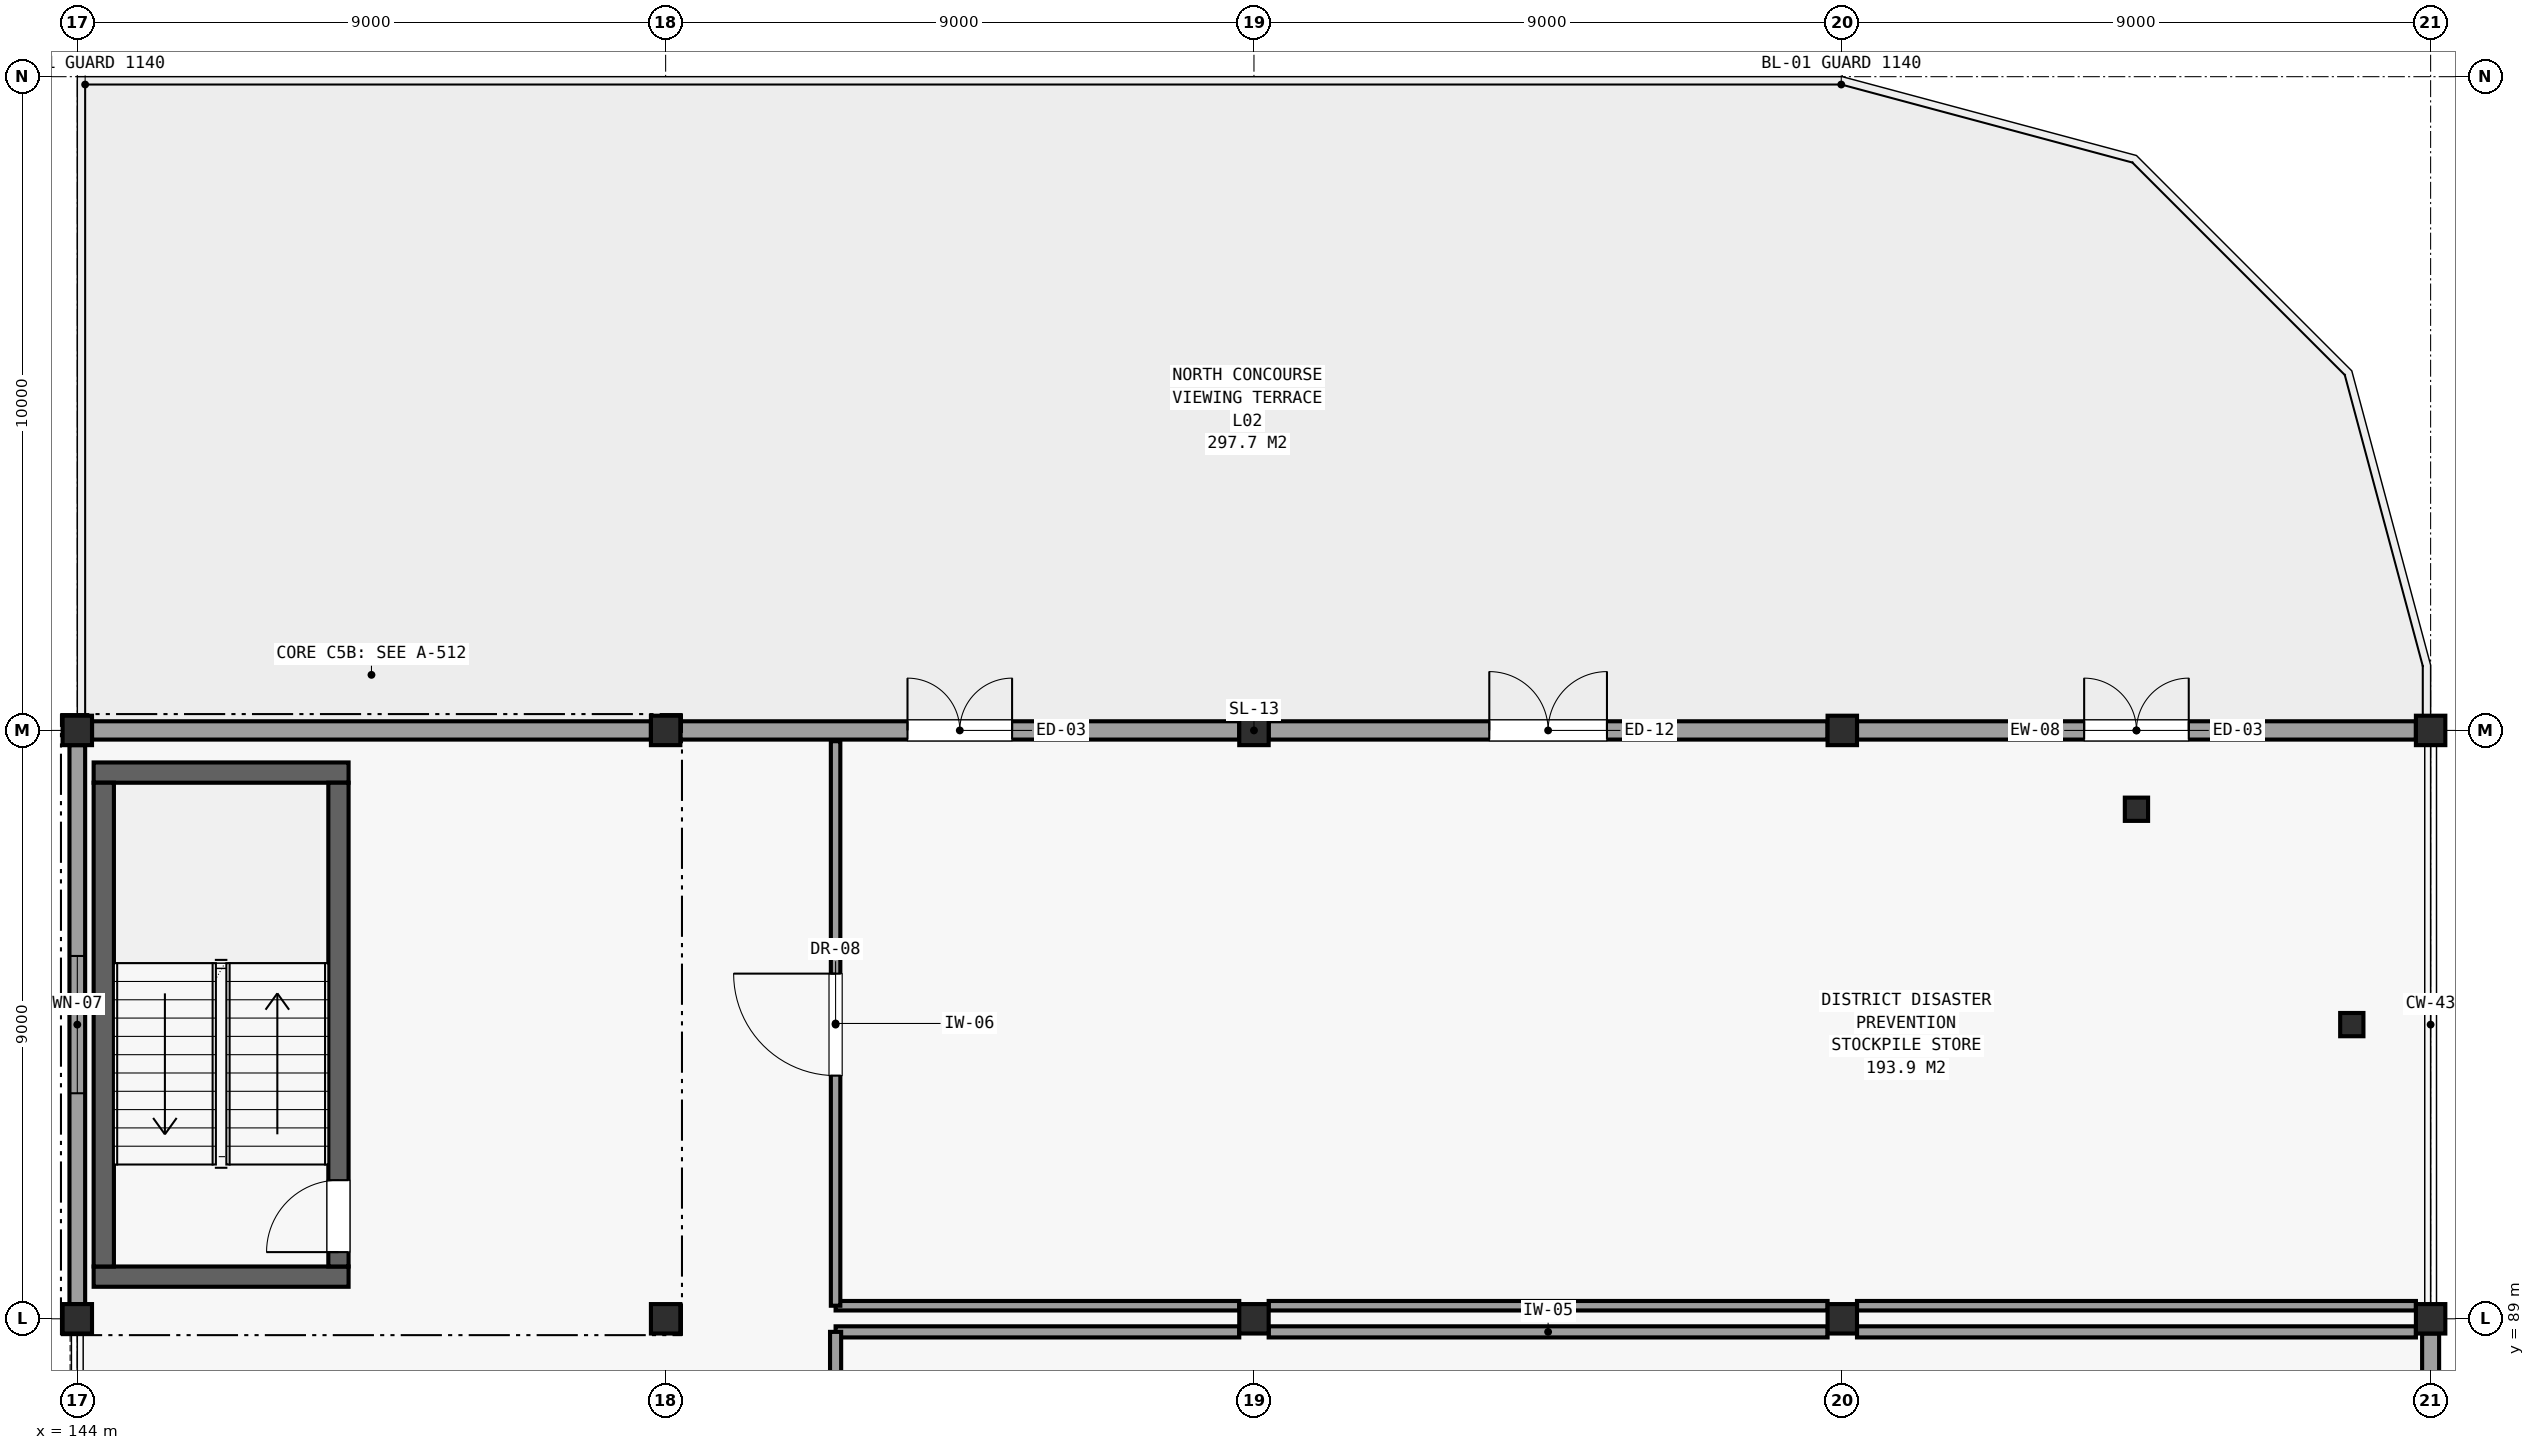
"""IFC4 building model, lengths in metres.
Left out: names, types, materials, properties, quantities, classifications, styles, units other than length and angle.
Written with IfcOpenShell. Run it as: python <this file> out.ifc"""

import sys

from ifc_helpers import new_model, si_unit, direction, frame, frame_2d, origin, origin_2d, place, context, subcontext, project, spatial, rectangle, hollow_rectangle, hollow_circle, extrude, element, fill, save


model = new_model("IFC4")
c1 = context("Model", 3, precision=1e-05, world=origin(), true_north=direction((0.0, 1.0)))
c2 = subcontext(c1, "Body", "Model", "MODEL_VIEW")
j1 = project(units=[si_unit("LENGTHUNIT", "METRE"), si_unit("PLANEANGLEUNIT", "RADIAN")], contexts=[c1])
p1 = place(None, origin())
s1 = spatial("IfcSite", under=j1, at=p1, CompositionType="ELEMENT")
p2 = place(p1, origin())
s2 = spatial("IfcBuilding", under=s1, at=p2, CompositionType="ELEMENT")
p3 = place(p2, frame((0.0, 0.0, 9.3)))
s3 = spatial("IfcBuildingStorey", under=s2, at=p3, CompositionType="ELEMENT", Elevation=9.3)
for number, where, z_axis, x_axis in (
    (1, (144.0, 89.0, 0.0), (0.0, 0.0, 1.0), (1.0, 0.0, 0.0)),
    (2, (144.0, 98.0, 0.0), (0.0, 0.0, 1.0), (1.0, 0.0, 0.0)),
    (3, (153.0, 89.0, 0.0), (0.0, 0.0, 1.0), (1.0, 0.0, 0.0)),
    (4, (153.0, 98.0, 0.0), (0.0, 0.0, 1.0), (1.0, 0.0, 0.0)),
    (5, (162.0, 89.0, 0.0), (0.0, 0.0, 1.0), (1.0, 0.0, 0.0)),
    (6, (162.0, 98.0, 0.0), (0.0, 0.0, 1.0), (1.0, 0.0, 0.0)),
    (7, (171.0, 89.0, 0.0), (0.0, 0.0, 1.0), (1.0, 0.0, 0.0)),
    (8, (171.0, 98.0, 0.0), (0.0, 0.0, 1.0), (1.0, 0.0, 0.0)),
):
    element("IfcColumn", number, at=place(p3, frame(where, z_axis=z_axis, x_axis=x_axis)), inside=s3, PredefinedType="COLUMN", context=c2, shape_type="SweptSolid", body=[
        extrude(hollow_rectangle(XDim=0.45, YDim=0.45, WallThickness=0.022, at=origin_2d()), origin(), (0.0, 0.0, 1.0), 4.2),
    ])
for number, where, z_axis, x_axis in (
    (9, (175.5, 96.794, 0.0), (0.0, 0.0, 1.0), (1.0, 0.0, 0.0)),
    (10, (178.794, 93.5, 0.0), (0.0, 0.0, 1.0), (1.0, 0.0, 0.0)),
):
    element("IfcColumn", number, at=place(p3, frame(where, z_axis=z_axis, x_axis=x_axis)), inside=s3, PredefinedType="COLUMN", context=c2, shape_type="SweptSolid", body=[
        extrude(hollow_circle(Radius=0.178, WallThickness=0.013, at=origin_2d()), origin(), (0.0, 0.0, 1.0), 4.2),
    ])
for number, where, z_axis, x_axis in (
    (11, (180.0, 89.0, 0.0), (0.0, 0.0, 1.0), (1.0, 0.0, 0.0)),
    (12, (180.0, 98.0, 0.0), (0.0, 0.0, 1.0), (1.0, 0.0, 0.0)),
):
    element("IfcColumn", number, at=place(p3, frame(where, z_axis=z_axis, x_axis=x_axis)), inside=s3, PredefinedType="COLUMN", context=c2, shape_type="SweptSolid", body=[
        extrude(hollow_rectangle(XDim=0.45, YDim=0.45, WallThickness=0.022, at=origin_2d()), origin(), (0.0, 0.0, 1.0), 4.2),
    ])
p4 = place(p3, frame((180.0, 80.225, 0.0), z_axis=(0.0, 0.0, 1.0), x_axis=(0.0, 1.0, 0.0)))
e13 = element("IfcWall", 13, at=p4, inside=s3, PredefinedType="SOLIDWALL", context=c2, shape_type="SweptSolid", body=[
    extrude(rectangle(XDim=8.55, YDim=0.26, at=frame_2d((4.275, 0.0))), origin(), (0.0, 0.0, 1.0), 3.3),
])
p5 = place(p4, frame((3.075, 0.0, 0.95)))
e14 = element("IfcOpeningElement", 14, at=p5, cuts=e13, PredefinedType="OPENING", context=c2, shape_type="SweptSolid", body=[
    extrude(rectangle(XDim=2.4, YDim=1.3, at=frame_2d((1.2, 0.65))), frame((0.0, 0.141, 0.0), z_axis=(0.0, -1.0, 0.0), x_axis=(1.0, 0.0, 0.0)), (0.0, 0.0, 1.0), 0.282),
])
p6 = place(p3, frame((179.775, 98.0, 0.0), z_axis=(0.0, 0.0, 1.0), x_axis=(-1.0, 0.0, 0.0)))
e15 = element("IfcWall", 15, at=p6, inside=s3, PredefinedType="SOLIDWALL", context=c2, shape_type="SweptSolid", body=[
    extrude(rectangle(XDim=8.55, YDim=0.28, at=frame_2d((4.275, 0.0))), origin(), (0.0, 0.0, 1.0), 3.362),
])
p7 = place(p6, frame((5.075, 0.0, 0.0), z_axis=(0.0, 0.0, 1.0), x_axis=(-1.0, 0.0, 0.0)))
e16 = element("IfcOpeningElement", 16, at=p7, cuts=e15, PredefinedType="OPENING", context=c2, shape_type="SweptSolid", body=[
    extrude(rectangle(XDim=1.6, YDim=2.2, at=frame_2d((0.8, 1.1))), frame((0.0, 0.151, 0.0), z_axis=(0.0, -1.0, 0.0), x_axis=(1.0, 0.0, 0.0)), (0.0, 0.0, 1.0), 0.302),
])
p8 = place(p3, frame((170.775, 98.0, 0.0), z_axis=(0.0, 0.0, 1.0), x_axis=(-1.0, 0.0, 0.0)))
e17 = element("IfcWall", 17, at=p8, inside=s3, PredefinedType="SOLIDWALL", context=c2, shape_type="SweptSolid", body=[
    extrude(rectangle(XDim=8.55, YDim=0.28, at=frame_2d((4.275, 0.0))), origin(), (0.0, 0.0, 1.0), 3.362),
])
p9 = place(p8, frame((5.175, 0.0, 0.0), z_axis=(0.0, 0.0, 1.0), x_axis=(-1.0, 0.0, 0.0)))
e18 = element("IfcOpeningElement", 18, at=p9, cuts=e17, PredefinedType="OPENING", context=c2, shape_type="SweptSolid", body=[
    extrude(rectangle(XDim=1.8, YDim=2.2, at=frame_2d((0.9, 1.1))), frame((0.0, 0.151, 0.0), z_axis=(0.0, -1.0, 0.0), x_axis=(1.0, 0.0, 0.0)), (0.0, 0.0, 1.0), 0.302),
])
p10 = place(p3, frame((161.775, 98.0, 0.0), z_axis=(0.0, 0.0, 1.0), x_axis=(-1.0, 0.0, 0.0)))
e19 = element("IfcWall", 19, at=p10, inside=s3, PredefinedType="SOLIDWALL", context=c2, shape_type="SweptSolid", body=[
    extrude(rectangle(XDim=8.55, YDim=0.28, at=frame_2d((4.275, 0.0))), origin(), (0.0, 0.0, 1.0), 3.362),
])
p11 = place(p10, frame((5.075, 0.0, 0.0), z_axis=(0.0, 0.0, 1.0), x_axis=(-1.0, 0.0, 0.0)))
e20 = element("IfcOpeningElement", 20, at=p11, cuts=e19, PredefinedType="OPENING", context=c2, shape_type="SweptSolid", body=[
    extrude(rectangle(XDim=1.6, YDim=2.2, at=frame_2d((0.8, 1.1))), frame((0.0, 0.151, 0.0), z_axis=(0.0, -1.0, 0.0), x_axis=(1.0, 0.0, 0.0)), (0.0, 0.0, 1.0), 0.302),
])
p12 = place(p3, frame((152.775, 98.0, 0.0), z_axis=(0.0, 0.0, 1.0), x_axis=(-1.0, 0.0, 0.0)))
e21 = element("IfcWall", 21, at=p12, inside=s3, PredefinedType="SOLIDWALL", context=c2, shape_type="SweptSolid", body=[
    extrude(rectangle(XDim=8.55, YDim=0.28, at=frame_2d((4.275, 0.0))), origin(), (0.0, 0.0, 1.0), 3.362),
])
p13 = place(p3, frame((144.0, 97.775, 0.0), z_axis=(0.0, 0.0, 1.0), x_axis=(0.0, -1.0, 0.0)))
e22 = element("IfcWall", 22, at=p13, inside=s3, PredefinedType="SOLIDWALL", context=c2, shape_type="SweptSolid", body=[
    extrude(rectangle(XDim=8.55, YDim=0.24, at=frame_2d((4.275, 0.0))), origin(), (0.0, 0.0, 1.0), 3.3),
])
p14 = place(p13, frame((3.225, 0.0, 0.95)))
e23 = element("IfcOpeningElement", 23, at=p14, cuts=e22, PredefinedType="OPENING", context=c2, shape_type="SweptSolid", body=[
    extrude(rectangle(XDim=2.1, YDim=1.3, at=frame_2d((1.05, 0.65))), frame((0.0, 0.131, 0.0), z_axis=(0.0, -1.0, 0.0), x_axis=(1.0, 0.0, 0.0)), (0.0, 0.0, 1.0), 0.262),
])
for number, where, z_axis, x_axis in (
    (24, (144.25, 89.645, 0.0), (0.0, 0.0, 1.0), (1.0, 0.0, 0.0)),
    (25, (144.25, 97.355, 0.0), (0.0, 0.0, 1.0), (1.0, 0.0, 0.0)),
):
    element("IfcWall", number, at=place(p3, frame(where, z_axis=z_axis, x_axis=x_axis)), inside=s3, PredefinedType="SHEAR", context=c2, shape_type="SweptSolid", body=[
        extrude(rectangle(XDim=3.9, YDim=0.31, at=frame_2d((1.95, 0.0))), origin(), (0.0, 0.0, 1.0), 3.95),
    ])
p15 = place(p3, frame((144.405, 89.8, 0.0), z_axis=(0.0, 0.0, 1.0), x_axis=(0.0, 1.0, 0.0)))
e26 = element("IfcWall", 26, at=p15, inside=s3, PredefinedType="SHEAR", context=c2, shape_type="SweptSolid", body=[
    extrude(rectangle(XDim=7.4, YDim=0.31, at=frame_2d((3.7, 0.0))), origin(), (0.0, 0.0, 1.0), 3.95),
])
p16 = place(p3, frame((147.995, 89.8, 0.0), z_axis=(0.0, 0.0, 1.0), x_axis=(0.0, 1.0, 0.0)))
e27 = element("IfcWall", 27, at=p16, inside=s3, PredefinedType="SHEAR", context=c2, shape_type="SweptSolid", body=[
    extrude(rectangle(XDim=7.4, YDim=0.31, at=frame_2d((3.7, 0.0))), origin(), (0.0, 0.0, 1.0), 3.95),
])
p17 = place(p16, frame((0.22, 0.0, 0.0)))
e28 = element("IfcOpeningElement", 28, at=p17, cuts=e27, PredefinedType="OPENING", context=c2, shape_type="SweptSolid", body=[
    extrude(rectangle(XDim=1.1, YDim=2.15, at=frame_2d((0.55, 1.075))), frame((0.0, 0.166, 0.0), z_axis=(0.0, -1.0, 0.0), x_axis=(1.0, 0.0, 0.0)), (0.0, 0.0, 1.0), 0.332),
])
p18 = place(p3, frame((155.6, 88.8, 0.0), z_axis=(0.0, 0.0, 1.0), x_axis=(1.0, 0.0, 0.0)))
e29 = element("IfcWall", 29, at=p18, inside=s3, PredefinedType="PARTITIONING", context=c2, shape_type="SweptSolid", body=[
    extrude(rectangle(XDim=6.175, YDim=0.17, at=frame_2d((3.087, 0.0))), origin(), (0.0, 0.0, 1.0), 3.3),
])
for number, where, z_axis, x_axis in (
    (30, (162.225, 88.8, 0.0), (0.0, 0.0, 1.0), (1.0, 0.0, 0.0)),
    (31, (171.225, 88.8, 0.0), (0.0, 0.0, 1.0), (1.0, 0.0, 0.0)),
):
    element("IfcWall", number, at=place(p3, frame(where, z_axis=z_axis, x_axis=x_axis)), inside=s3, PredefinedType="PARTITIONING", context=c2, shape_type="SweptSolid", body=[
        extrude(rectangle(XDim=8.55, YDim=0.17, at=frame_2d((4.275, 0.0))), origin(), (0.0, 0.0, 1.0), 3.3),
    ])
p19 = place(p3, frame((155.6, 62.2, 0.0), z_axis=(0.0, 0.0, 1.0), x_axis=(0.0, 1.0, 0.0)))
e32 = element("IfcWall", 32, at=p19, inside=s3, PredefinedType="PARTITIONING", context=c2, shape_type="SweptSolid", body=[
    extrude(rectangle(XDim=26.6, YDim=0.17, at=frame_2d((13.3, 0.0))), origin(), (0.0, 0.0, 1.0), 3.362),
])
p20 = place(p19, frame((12.56, 0.0, 0.0)))
e33 = element("IfcOpeningElement", 33, at=p20, cuts=e32, PredefinedType="OPENING", context=c2, shape_type="SweptSolid", body=[
    extrude(rectangle(XDim=1.48, YDim=2.35, at=frame_2d((0.74, 1.175))), frame((0.0, 0.096, 0.0), z_axis=(0.0, -1.0, 0.0), x_axis=(1.0, 0.0, 0.0)), (0.0, 0.0, 1.0), 0.192),
])
p21 = place(p3, frame((155.6, 89.2, 0.0), z_axis=(0.0, 0.0, 1.0), x_axis=(1.0, 0.0, 0.0)))
e34 = element("IfcWall", 34, at=p21, inside=s3, PredefinedType="PARTITIONING", context=c2, shape_type="SweptSolid", body=[
    extrude(rectangle(XDim=6.175, YDim=0.145, at=frame_2d((3.087, 0.0))), origin(), (0.0, 0.0, 1.0), 3.3),
])
for number, where, z_axis, x_axis in (
    (35, (162.225, 89.2, 0.0), (0.0, 0.0, 1.0), (1.0, 0.0, 0.0)),
    (36, (171.225, 89.2, 0.0), (0.0, 0.0, 1.0), (1.0, 0.0, 0.0)),
):
    element("IfcWall", number, at=place(p3, frame(where, z_axis=z_axis, x_axis=x_axis)), inside=s3, PredefinedType="PARTITIONING", context=c2, shape_type="SweptSolid", body=[
        extrude(rectangle(XDim=8.55, YDim=0.145, at=frame_2d((4.275, 0.0))), origin(), (0.0, 0.0, 1.0), 3.3),
    ])
p22 = place(p3, frame((155.6, 89.2, 0.0), z_axis=(0.0, 0.0, 1.0), x_axis=(0.0, 1.0, 0.0)))
e37 = element("IfcWall", 37, at=p22, inside=s3, PredefinedType="PARTITIONING", context=c2, shape_type="SweptSolid", body=[
    extrude(rectangle(XDim=8.635, YDim=0.145, at=frame_2d((4.317, 0.0))), origin(), (0.0, 0.0, 1.0), 3.362),
])
p23 = place(p22, frame((3.52, 0.0, 0.0)))
e38 = element("IfcOpeningElement", 38, at=p23, cuts=e37, PredefinedType="OPENING", context=c2, shape_type="SweptSolid", body=[
    extrude(rectangle(XDim=1.56, YDim=2.35, at=frame_2d((0.78, 1.175))), frame((0.0, 0.083, 0.0), z_axis=(0.0, -1.0, 0.0), x_axis=(1.0, 0.0, 0.0)), (0.0, 0.0, 1.0), 0.167),
])
p24 = place(p7, origin())
e39 = element("IfcDoor", 39, at=p24, inside=s3, OperationType="SINGLE_SWING_LEFT", PredefinedType="DOOR", context=c2, shape_type="SweptSolid", body=[
    extrude(rectangle(XDim=1.6, YDim=2.2, at=frame_2d((0.8, 1.1))), frame((0.0, 0.025, 0.0), z_axis=(0.0, -1.0, 0.0), x_axis=(1.0, 0.0, 0.0)), (0.0, 0.0, 1.0), 0.05),
])
fill(e16, e39)
p25 = place(p9, origin())
e40 = element("IfcDoor", 40, at=p25, inside=s3, OperationType="SINGLE_SWING_LEFT", PredefinedType="DOOR", context=c2, shape_type="SweptSolid", body=[
    extrude(rectangle(XDim=1.8, YDim=2.2, at=frame_2d((0.9, 1.1))), frame((0.0, 0.025, 0.0), z_axis=(0.0, -1.0, 0.0), x_axis=(1.0, 0.0, 0.0)), (0.0, 0.0, 1.0), 0.05),
])
fill(e18, e40)
p26 = place(p11, origin())
e41 = element("IfcDoor", 41, at=p26, inside=s3, OperationType="SINGLE_SWING_LEFT", PredefinedType="DOOR", context=c2, shape_type="SweptSolid", body=[
    extrude(rectangle(XDim=1.6, YDim=2.2, at=frame_2d((0.8, 1.1))), frame((0.0, 0.025, 0.0), z_axis=(0.0, -1.0, 0.0), x_axis=(1.0, 0.0, 0.0)), (0.0, 0.0, 1.0), 0.05),
])
fill(e20, e41)
p27 = place(p14, origin())
e42 = element("IfcWindow", 42, at=p27, inside=s3, PartitioningType="SINGLE_PANEL", PredefinedType="WINDOW", context=c2, shape_type="SweptSolid", body=[
    extrude(rectangle(XDim=2.1, YDim=1.3, at=frame_2d((1.05, 0.65))), frame((0.0, 0.03, 0.0), z_axis=(0.0, -1.0, 0.0), x_axis=(1.0, 0.0, 0.0)), (0.0, 0.0, 1.0), 0.06),
])
fill(e23, e42)
p28 = place(p17, origin())
e43 = element("IfcDoor", 43, at=p28, inside=s3, OperationType="SINGLE_SWING_LEFT", PredefinedType="DOOR", context=c2, shape_type="SweptSolid", body=[
    extrude(rectangle(XDim=1.1, YDim=2.15, at=frame_2d((0.55, 1.075))), frame((0.0, 0.025, 0.0), z_axis=(0.0, -1.0, 0.0), x_axis=(1.0, 0.0, 0.0)), (0.0, 0.0, 1.0), 0.05),
])
fill(e28, e43)
p29 = place(p23, origin())
e44 = element("IfcDoor", 44, at=p29, inside=s3, OperationType="SINGLE_SWING_RIGHT", PredefinedType="DOOR", context=c2, shape_type="SweptSolid", body=[
    extrude(rectangle(XDim=1.56, YDim=2.35, at=frame_2d((0.78, 1.175))), frame((0.0, 0.025, 0.0), z_axis=(0.0, -1.0, 0.0), x_axis=(1.0, 0.0, 0.0)), (0.0, 0.0, 1.0), 0.05),
])
fill(e38, e44)
save(model, sys.argv[1])
